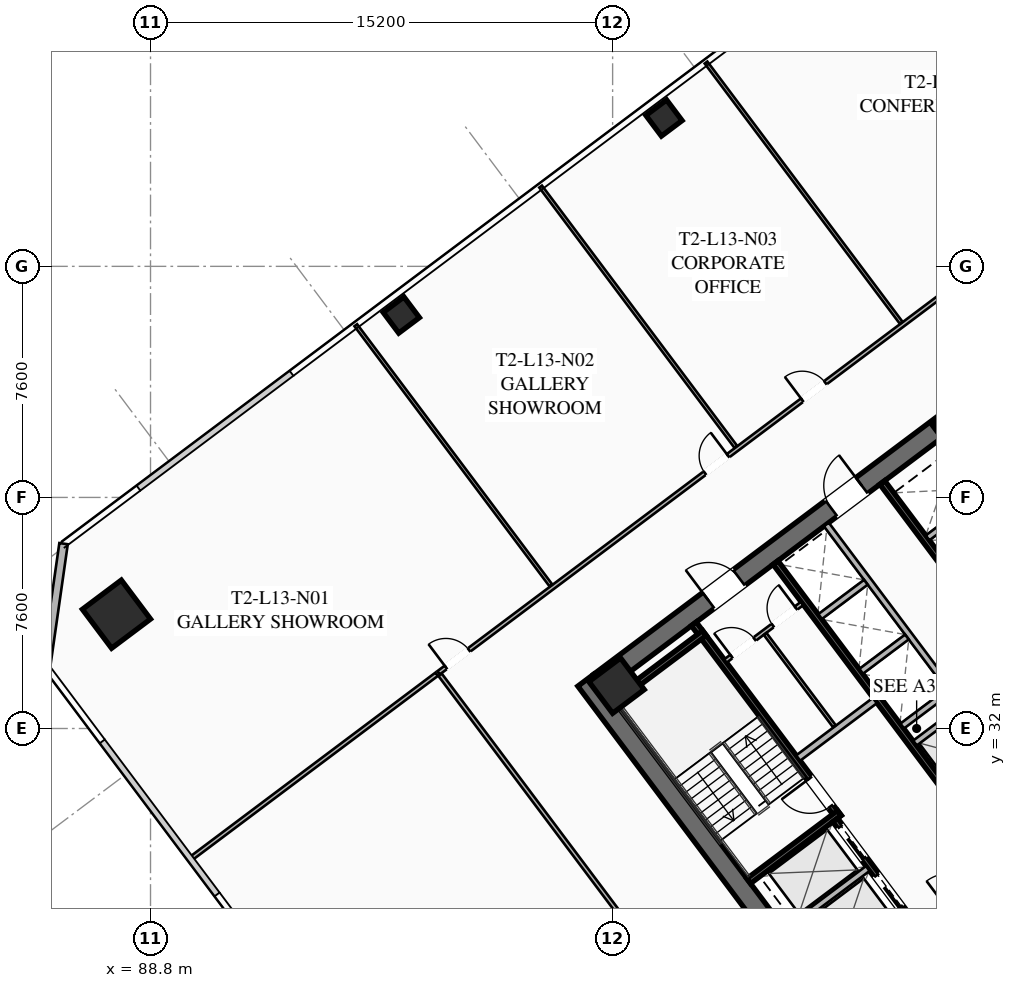
"""IFC4 building model, lengths in metres.
Left out: names, types, materials, properties, quantities, classifications, styles, units other than length and angle.
Written with IfcOpenShell. Run it as: python <this file> out.ifc"""

import sys

from ifc_helpers import new_model, si_unit, direction, frame, frame_2d, origin, origin_2d, place, context, subcontext, project, spatial, rectangle, hollow_rectangle, extrude, element, fill, save


model = new_model("IFC4")
c1 = context("Model", 3, precision=1e-05, world=origin(), true_north=direction((0.0, 1.0)))
c2 = subcontext(c1, "Body", "Model", "MODEL_VIEW")
j1 = project(units=[si_unit("LENGTHUNIT", "METRE"), si_unit("PLANEANGLEUNIT", "RADIAN")], contexts=[c1])
p1 = place(None, origin())
s1 = spatial("IfcSite", under=j1, at=p1, CompositionType="ELEMENT")
p2 = place(p1, origin())
s2 = spatial("IfcBuilding", under=s1, at=p2, CompositionType="ELEMENT")
p3 = place(p2, frame((0.0, 0.0, 53.0)))
s3 = spatial("IfcBuildingStorey", under=s2, at=p3, CompositionType="ELEMENT", Elevation=53.0)
p4 = place(p3, frame((112.476, 21.107, 0.0), z_axis=(0.0, 0.0, 1.0), x_axis=(-0.600005007985, 0.799996243986, 0.0)))
e1 = element("IfcWall", 1, at=p4, inside=s3, PredefinedType="SHEAR", context=c2, shape_type="SweptSolid", body=[
    extrude(rectangle(XDim=15.6, YDim=0.65, at=frame_2d((7.8, 0.0))), origin(), (0.0, 0.0, 1.0), 3.55),
])
p5 = place(p3, frame((124.429, 30.478, 0.0), z_axis=(0.0, 0.0, 1.0), x_axis=(-0.799998028465, -0.600002628705, 0.0)))
e2 = element("IfcWall", 2, at=p5, inside=s3, PredefinedType="SHEAR", context=c2, shape_type="SweptSolid", body=[
    extrude(rectangle(XDim=14.86, YDim=0.65, at=frame_2d((7.43, 0.0))), origin(), (0.0, 0.0, 1.0), 3.55),
])
p6 = place(p5, frame((9.13, 0.0, 0.0)))
e3 = element("IfcOpeningElement", 3, at=p6, cuts=e2, PredefinedType="OPENING", context=c2, shape_type="SweptSolid", body=[
    extrude(rectangle(XDim=1.25, YDim=2.25, at=frame_2d((0.625, 1.125))), frame((0.0, 0.335, 0.0), z_axis=(0.0, -1.0, 0.0), x_axis=(1.0, 0.0, 0.0)), (0.0, 0.0, 1.0), 0.67),
])
p7 = place(p5, frame((4.08, 0.0, 0.0)))
e4 = element("IfcOpeningElement", 4, at=p7, cuts=e2, PredefinedType="OPENING", context=c2, shape_type="SweptSolid", body=[
    extrude(rectangle(XDim=1.25, YDim=2.25, at=frame_2d((0.625, 1.125))), frame((0.0, 0.335, 0.0), z_axis=(0.0, -1.0, 0.0), x_axis=(1.0, 0.0, 0.0)), (0.0, 0.0, 1.0), 0.67),
])
p8 = place(p3, frame((103.571, 33.522, 0.0), z_axis=(0.0, 0.0, 1.0), x_axis=(0.799998028465, 0.600002628705, 0.0)))
e5 = element("IfcWall", 5, at=p8, inside=s3, PredefinedType="SHEAR", context=c2, shape_type="SweptSolid", body=[
    extrude(rectangle(XDim=14.86, YDim=0.65, at=frame_2d((7.43, 0.0))), origin(), (0.0, 0.0, 1.0), 3.55),
])
p9 = place(p8, frame((4.48, 0.0, 0.0)))
e6 = element("IfcOpeningElement", 6, at=p9, cuts=e5, PredefinedType="OPENING", context=c2, shape_type="SweptSolid", body=[
    extrude(rectangle(XDim=1.25, YDim=2.25, at=frame_2d((0.625, 1.125))), frame((0.0, 0.335, 0.0), z_axis=(0.0, -1.0, 0.0), x_axis=(1.0, 0.0, 0.0)), (0.0, 0.0, 1.0), 0.67),
])
p10 = place(p8, frame((9.53, 0.0, 0.0)))
e7 = element("IfcOpeningElement", 7, at=p10, cuts=e5, PredefinedType="OPENING", context=c2, shape_type="SweptSolid", body=[
    extrude(rectangle(XDim=1.25, YDim=2.25, at=frame_2d((0.625, 1.125))), frame((0.0, 0.335, 0.0), z_axis=(0.0, -1.0, 0.0), x_axis=(1.0, 0.0, 0.0)), (0.0, 0.0, 1.0), 0.67),
])
for number, where, z_axis, x_axis in (
    (8, (115.41, 41.87, 0.0), (0.0, 0.0, 1.0), (0.8, 0.6, 0.0)),
    (9, (104.13, 33.41, 0.0), (0.0, 0.0, 1.0), (0.8, 0.6, 0.0)),
):
    element("IfcColumn", number, at=place(p3, frame(where, z_axis=z_axis, x_axis=x_axis)), inside=s3, PredefinedType="COLUMN", context=c2, shape_type="SweptSolid", body=[
        extrude(hollow_rectangle(XDim=1.3, YDim=1.3, WallThickness=0.05, at=origin_2d()), origin(), (0.0, 0.0, 1.0), 3.35),
    ])
p11 = place(p3, frame((87.68, 35.76, 0.0), z_axis=(0.0, 0.0, 1.0), x_axis=(0.799999996291, 0.600000004945, 0.0)))
e10 = element("IfcColumn", 10, at=p11, inside=s3, PredefinedType="COLUMN", context=c2, shape_type="SweptSolid", body=[
    extrude(hollow_rectangle(XDim=1.6, YDim=1.6, WallThickness=0.06, at=origin_2d()), origin(), (0.0, 0.0, 1.0), 3.35),
])
for number, where, z_axis, x_axis in (
    (11, (105.69, 52.08, 0.0), (0.0, 0.0, 1.0), (0.8, 0.6, 0.0)),
    (12, (97.05, 45.6, 0.0), (0.0, 0.0, 1.0), (0.8, 0.6, 0.0)),
):
    element("IfcColumn", number, at=place(p3, frame(where, z_axis=z_axis, x_axis=x_axis)), inside=s3, PredefinedType="COLUMN", context=c2, shape_type="SweptSolid", body=[
        extrude(hollow_rectangle(XDim=0.85, YDim=0.85, WallThickness=0.035, at=origin_2d()), origin(), (0.0, 0.0, 1.0), 3.35),
    ])
p12 = place(p3, frame((85.36, 34.02, 0.0), z_axis=(0.0, 0.0, 1.0), x_axis=(0.14137968631, 0.989955445613, 0.0)))
e13 = element("IfcWall", 13, at=p12, inside=s3, PredefinedType="SOLIDWALL", context=c2, shape_type="SweptSolid", body=[
    extrude(rectangle(XDim=4.101, YDim=0.28, at=frame_2d((2.051, 0.0))), origin(), (0.0, 0.0, 1.0), 3.35),
])
p13 = place(p3, frame((111.44, 29.08, 0.0), z_axis=(0.0, 0.0, 1.0), x_axis=(-0.600009827119, 0.799992629566, 0.0)))
e14 = element("IfcWall", 14, at=p13, inside=s3, PredefinedType="SHEAR", context=c2, shape_type="SweptSolid", body=[
    extrude(rectangle(XDim=7.95, YDim=0.2, at=frame_2d((3.975, 0.0))), origin(), (0.0, 0.0, 1.0), 3.35),
])
p14 = place(p13, frame((0.45, 0.0, 0.0)))
e15 = element("IfcOpeningElement", 15, at=p14, cuts=e14, PredefinedType="OPENING", context=c2, shape_type="SweptSolid", body=[
    extrude(rectangle(XDim=1.15, YDim=2.2, at=frame_2d((0.575, 1.1))), frame((0.0, 0.11, 0.0), z_axis=(0.0, -1.0, 0.0), x_axis=(1.0, 0.0, 0.0)), (0.0, 0.0, 1.0), 0.22),
])
for number, where, z_axis, x_axis in (
    (16, (108.476, 26.982, 0.0), (0.0, 0.0, 1.0), (0.8, 0.6, 0.0)),
    (17, (104.036, 32.902, 0.0), (0.0, 0.0, 1.0), (0.8, 0.6, 0.0)),
):
    element("IfcWall", number, at=place(p3, frame(where, z_axis=z_axis, x_axis=x_axis)), inside=s3, PredefinedType="SHEAR", context=c2, shape_type="SweptSolid", body=[
        extrude(rectangle(XDim=3.73, YDim=0.2, at=frame_2d((1.865, 0.0))), origin(), (0.0, 0.0, 1.0), 3.35),
    ])
p15 = place(p3, frame((117.938, 26.016, 0.0), z_axis=(0.0, 0.0, 1.0), x_axis=(-0.600005463273, 0.799995902516, 0.0)))
e18 = element("IfcWall", 18, at=p15, inside=s3, PredefinedType="SHEAR", context=c2, shape_type="SweptSolid", body=[
    extrude(rectangle(XDim=14.3, YDim=0.2, at=frame_2d((7.15, 0.0))), origin(), (0.0, 0.0, 1.0), 3.35),
])
p16 = place(p3, frame((110.104, 31.028, 0.0), z_axis=(0.0, 0.0, 1.0), x_axis=(0.800018601094, 0.59997519774, 0.0)))
e19 = element("IfcWall", 19, at=p16, inside=s3, PredefinedType="SOLIDWALL", context=c2, shape_type="SweptSolid", body=[
    extrude(rectangle(XDim=3.15, YDim=0.22, at=frame_2d((1.575, 0.0))), origin(), (0.0, 0.0, 1.0), 2.703),
])
p17 = place(p3, frame((114.316, 25.412, 0.0), z_axis=(0.0, 0.0, 1.0), x_axis=(0.800018601094, 0.59997519774, 0.0)))
e20 = element("IfcWall", 20, at=p17, inside=s3, PredefinedType="SOLIDWALL", context=c2, shape_type="SweptSolid", body=[
    extrude(rectangle(XDim=3.15, YDim=0.22, at=frame_2d((1.575, 0.0))), origin(), (0.0, 0.0, 1.0), 2.703),
])
p18 = place(p17, frame((0.95, 0.0, 0.0)))
e21 = element("IfcOpeningElement", 21, at=p18, cuts=e20, PredefinedType="OPENING", context=c2, shape_type="SweptSolid", body=[
    extrude(rectangle(XDim=1.25, YDim=2.25, at=frame_2d((0.625, 1.125))), frame((0.0, 0.12, 0.0), z_axis=(0.0, -1.0, 0.0), x_axis=(1.0, 0.0, 0.0)), (0.0, 0.0, 1.0), 0.24),
])
p19 = place(p3, frame((115.13, 23.91, 0.0), z_axis=(0.0, 0.0, 1.0), x_axis=(-0.599975393228, 0.800018454488, 0.0)))
e22 = element("IfcWall", 22, at=p19, inside=s3, PredefinedType="SHEAR", context=c2, shape_type="SweptSolid", body=[
    extrude(rectangle(XDim=6.35, YDim=0.2, at=frame_2d((3.175, 0.0))), origin(), (0.0, 0.0, 1.0), 3.35),
])
p20 = place(p19, frame((4.775, 0.0, 0.0)))
e23 = element("IfcOpeningElement", 23, at=p20, cuts=e22, PredefinedType="OPENING", context=c2, shape_type="SweptSolid", body=[
    extrude(rectangle(XDim=1.3, YDim=2.25, at=frame_2d((0.65, 1.125))), frame((0.0, 0.11, 0.0), z_axis=(0.0, -1.0, 0.0), x_axis=(1.0, 0.0, 0.0)), (0.0, 0.0, 1.0), 0.22),
])
p21 = place(p19, frame((2.775, 0.0, 0.0)))
e24 = element("IfcOpeningElement", 24, at=p21, cuts=e22, PredefinedType="OPENING", context=c2, shape_type="SweptSolid", body=[
    extrude(rectangle(XDim=1.3, YDim=2.25, at=frame_2d((0.65, 1.125))), frame((0.0, 0.11, 0.0), z_axis=(0.0, -1.0, 0.0), x_axis=(1.0, 0.0, 0.0)), (0.0, 0.0, 1.0), 0.22),
])
p22 = place(p19, frame((0.575, 0.0, 0.0)))
e25 = element("IfcOpeningElement", 25, at=p22, cuts=e22, PredefinedType="OPENING", context=c2, shape_type="SweptSolid", body=[
    extrude(rectangle(XDim=1.3, YDim=2.25, at=frame_2d((0.65, 1.125))), frame((0.0, 0.11, 0.0), z_axis=(0.0, -1.0, 0.0), x_axis=(1.0, 0.0, 0.0)), (0.0, 0.0, 1.0), 0.22),
])
p23 = place(p3, frame((109.688, 25.366, 0.0), z_axis=(0.0, 0.0, 1.0), x_axis=(0.8, 0.6, 0.0)))
e26 = element("IfcWall", 26, at=p23, inside=s3, PredefinedType="SOLIDWALL", context=c2, shape_type="SweptSolid", body=[
    extrude(rectangle(XDim=3.38, YDim=0.2, at=frame_2d((1.69, 0.0))), origin(), (0.0, 0.0, 1.0), 3.35),
])
p24 = place(p3, frame((112.87, 40.09, 0.0), z_axis=(0.0, 0.0, 1.0), x_axis=(0.599975393228, -0.800018454488, 0.0)))
e27 = element("IfcWall", 27, at=p24, inside=s3, PredefinedType="SHEAR", context=c2, shape_type="SweptSolid", body=[
    extrude(rectangle(XDim=6.35, YDim=0.2, at=frame_2d((3.175, 0.0))), origin(), (0.0, 0.0, 1.0), 3.35),
])
p25 = place(p3, frame((114.36, 38.27, 0.0), z_axis=(0.0, 0.0, 1.0), x_axis=(0.799973995579, 0.600034670996, 0.0)))
e28 = element("IfcWall", 28, at=p25, inside=s3, PredefinedType="SOLIDWALL", context=c2, shape_type="SweptSolid", body=[
    extrude(rectangle(XDim=3.38, YDim=0.2, at=frame_2d((1.69, 0.0))), origin(), (0.0, 0.0, 1.0), 3.35),
])
p26 = place(p3, frame((107.71, 34.22, 0.0), z_axis=(0.0, 0.0, 1.0), x_axis=(0.799981399002, 0.60002480053, 0.0)))
e29 = element("IfcWall", 29, at=p26, inside=s3, PredefinedType="PARTITIONING", context=c2, shape_type="SweptSolid", body=[
    extrude(rectangle(XDim=3.15, YDim=0.135, at=frame_2d((1.575, 0.0))), origin(), (0.0, 0.0, 1.0), 2.703),
])
p27 = place(p26, frame((0.25, 0.0, 0.0)))
e30 = element("IfcOpeningElement", 30, at=p27, cuts=e29, PredefinedType="OPENING", context=c2, shape_type="SweptSolid", body=[
    extrude(rectangle(XDim=0.95, YDim=2.05, at=frame_2d((0.475, 1.025))), frame((0.0, 0.077, 0.0), z_axis=(0.0, -1.0, 0.0), x_axis=(1.0, 0.0, 0.0)), (0.0, 0.0, 1.0), 0.155),
])
p28 = place(p26, frame((1.95, 0.0, 0.0)))
e31 = element("IfcOpeningElement", 31, at=p28, cuts=e29, PredefinedType="OPENING", context=c2, shape_type="SweptSolid", body=[
    extrude(rectangle(XDim=0.95, YDim=2.05, at=frame_2d((0.475, 1.025))), frame((0.0, 0.077, 0.0), z_axis=(0.0, -1.0, 0.0), x_axis=(1.0, 0.0, 0.0)), (0.0, 0.0, 1.0), 0.155),
])
p29 = place(p3, frame((111.296, 32.072, 0.0), z_axis=(0.0, 0.0, 1.0), x_axis=(-0.59995887973, 0.800030838552, 0.0)))
e32 = element("IfcWall", 32, at=p29, inside=s3, PredefinedType="PARTITIONING", context=c2, shape_type="SweptSolid", body=[
    extrude(rectangle(XDim=3.8, YDim=0.11, at=frame_2d((1.9, 0.0))), origin(), (0.0, 0.0, 1.0), 2.703),
])
p30 = place(p3, frame((113.946, 31.522, 0.0), z_axis=(0.0, 0.0, 1.0), x_axis=(0.8, 0.6, 0.0)))
e33 = element("IfcWall", 33, at=p30, inside=s3, PredefinedType="SOLIDWALL", context=c2, shape_type="SweptSolid", body=[
    extrude(rectangle(XDim=1.88, YDim=0.2, at=frame_2d((0.94, 0.0))), origin(), (0.0, 0.0, 1.0), 3.35),
])
p31 = place(p3, frame((115.11, 33.27, 0.0), z_axis=(0.0, 0.0, 1.0), x_axis=(-0.600011488909, 0.79999138319, 0.0)))
e34 = element("IfcWall", 34, at=p31, inside=s3, PredefinedType="SOLIDWALL", context=c2, shape_type="SweptSolid", body=[
    extrude(rectangle(XDim=6.8, YDim=0.2, at=frame_2d((3.4, 0.0))), origin(), (0.0, 0.0, 1.0), 3.35),
])
p32 = place(p3, frame((113.526, 32.082, 0.0), z_axis=(0.0, 0.0, 1.0), x_axis=(0.800046745961, 0.599937666993, 0.0)))
e35 = element("IfcWall", 35, at=p32, inside=s3, PredefinedType="SOLIDWALL", context=c2, shape_type="SweptSolid", body=[
    extrude(rectangle(XDim=1.88, YDim=0.2, at=frame_2d((0.94, 0.0))), origin(), (0.0, 0.0, 1.0), 3.35),
])
p33 = place(p3, frame((112.176, 33.882, 0.0), z_axis=(0.0, 0.0, 1.0), x_axis=(0.8, 0.6, 0.0)))
e36 = element("IfcWall", 36, at=p33, inside=s3, PredefinedType="SOLIDWALL", context=c2, shape_type="SweptSolid", body=[
    extrude(rectangle(XDim=1.88, YDim=0.2, at=frame_2d((0.94, 0.0))), origin(), (0.0, 0.0, 1.0), 3.35),
])
p34 = place(p3, frame((110.826, 35.682, 0.0), z_axis=(0.0, 0.0, 1.0), x_axis=(0.799984418148, 0.600020775241, 0.0)))
e37 = element("IfcWall", 37, at=p34, inside=s3, PredefinedType="SOLIDWALL", context=c2, shape_type="SweptSolid", body=[
    extrude(rectangle(XDim=1.88, YDim=0.2, at=frame_2d((0.94, 0.0))), origin(), (0.0, 0.0, 1.0), 3.35),
])
p35 = place(p3, frame((98.276, 33.832, 0.0), z_axis=(0.0, 0.0, 1.0), x_axis=(0.800001944698, 0.59999740706, 0.0)))
e38 = element("IfcWall", 38, at=p35, inside=s3, PredefinedType="PARTITIONING", context=c2, shape_type="SweptSolid", body=[
    extrude(rectangle(XDim=30.13, YDim=0.135, at=frame_2d((15.065, 0.0))), origin(), (0.0, 0.0, 1.0), 2.703),
])
p36 = place(p35, frame((0.3, 0.0, 0.0)))
e39 = element("IfcOpeningElement", 39, at=p36, cuts=e38, PredefinedType="OPENING", context=c2, shape_type="SweptSolid", body=[
    extrude(rectangle(XDim=0.95, YDim=2.05, at=frame_2d((0.475, 1.025))), frame((0.0, 0.077, 0.0), z_axis=(0.0, -1.0, 0.0), x_axis=(1.0, 0.0, 0.0)), (0.0, 0.0, 1.0), 0.155),
])
p37 = place(p35, frame((10.95, 0.0, 0.0)))
e40 = element("IfcOpeningElement", 40, at=p37, cuts=e38, PredefinedType="OPENING", context=c2, shape_type="SweptSolid", body=[
    extrude(rectangle(XDim=0.95, YDim=2.05, at=frame_2d((0.475, 1.025))), frame((0.0, 0.077, 0.0), z_axis=(0.0, -1.0, 0.0), x_axis=(1.0, 0.0, 0.0)), (0.0, 0.0, 1.0), 0.155),
])
p38 = place(p35, frame((14.95, 0.0, 0.0)))
e41 = element("IfcOpeningElement", 41, at=p38, cuts=e38, PredefinedType="OPENING", context=c2, shape_type="SweptSolid", body=[
    extrude(rectangle(XDim=0.95, YDim=2.05, at=frame_2d((0.475, 1.025))), frame((0.0, 0.077, 0.0), z_axis=(0.0, -1.0, 0.0), x_axis=(1.0, 0.0, 0.0)), (0.0, 0.0, 1.0), 0.155),
])
p39 = place(p35, frame((28.88, 0.0, 0.0)))
e42 = element("IfcOpeningElement", 42, at=p39, cuts=e38, PredefinedType="OPENING", context=c2, shape_type="SweptSolid", body=[
    extrude(rectangle(XDim=0.95, YDim=2.05, at=frame_2d((0.475, 1.025))), frame((0.0, 0.077, 0.0), z_axis=(0.0, -1.0, 0.0), x_axis=(1.0, 0.0, 0.0)), (0.0, 0.0, 1.0), 0.155),
])
p40 = place(p3, frame((101.972, 36.704, 0.0), z_axis=(0.0, 0.0, 1.0), x_axis=(-0.600003650761, 0.799997261916, 0.0)))
e43 = element("IfcWall", 43, at=p40, inside=s3, PredefinedType="PARTITIONING", context=c2, shape_type="SweptSolid", body=[
    extrude(rectangle(XDim=10.7, YDim=0.11, at=frame_2d((5.35, 0.0))), origin(), (0.0, 0.0, 1.0), 2.703),
])
for number, where, z_axis, x_axis in (
    (44, (108.052, 41.264, 0.0), (0.0, 0.0, 1.0), (-0.6, 0.8, 0.0)),
    (45, (113.492, 45.344, 0.0), (0.0, 0.0, 1.0), (-0.6, 0.8, 0.0)),
):
    element("IfcWall", number, at=place(p3, frame(where, z_axis=z_axis, x_axis=x_axis)), inside=s3, PredefinedType="PARTITIONING", context=c2, shape_type="SweptSolid", body=[
        extrude(rectangle(XDim=10.7, YDim=0.11, at=frame_2d((5.35, 0.0))), origin(), (0.0, 0.0, 1.0), 2.703),
    ])
p41 = place(p3, frame((135.46, 34.47, 0.0), z_axis=(0.0, 0.0, 1.0), x_axis=(-0.800001944698, -0.59999740706, 0.0)))
e46 = element("IfcWall", 46, at=p41, inside=s3, PredefinedType="PARTITIONING", context=c2, shape_type="SweptSolid", body=[
    extrude(rectangle(XDim=30.13, YDim=0.135, at=frame_2d((15.065, 0.0))), origin(), (0.0, 0.0, 1.0), 2.703),
])
p42 = place(p41, frame((28.8, 0.0, 0.0)))
e47 = element("IfcOpeningElement", 47, at=p42, cuts=e46, PredefinedType="OPENING", context=c2, shape_type="SweptSolid", body=[
    extrude(rectangle(XDim=0.95, YDim=2.05, at=frame_2d((0.475, 1.025))), frame((0.0, 0.077, 0.0), z_axis=(0.0, -1.0, 0.0), x_axis=(1.0, 0.0, 0.0)), (0.0, 0.0, 1.0), 0.155),
])
p43 = place(p41, frame((17.921, 0.0, 0.0)))
e48 = element("IfcOpeningElement", 48, at=p43, cuts=e46, PredefinedType="OPENING", context=c2, shape_type="SweptSolid", body=[
    extrude(rectangle(XDim=0.95, YDim=2.05, at=frame_2d((0.475, 1.025))), frame((0.0, 0.077, 0.0), z_axis=(0.0, -1.0, 0.0), x_axis=(1.0, 0.0, 0.0)), (0.0, 0.0, 1.0), 0.155),
])
p44 = place(p41, frame((14.129, 0.0, 0.0)))
e49 = element("IfcOpeningElement", 49, at=p44, cuts=e46, PredefinedType="OPENING", context=c2, shape_type="SweptSolid", body=[
    extrude(rectangle(XDim=0.95, YDim=2.05, at=frame_2d((0.475, 1.025))), frame((0.0, 0.077, 0.0), z_axis=(0.0, -1.0, 0.0), x_axis=(1.0, 0.0, 0.0)), (0.0, 0.0, 1.0), 0.155),
])
p45 = place(p41, frame((0.38, 0.0, 0.0)))
e50 = element("IfcOpeningElement", 50, at=p45, cuts=e46, PredefinedType="OPENING", context=c2, shape_type="SweptSolid", body=[
    extrude(rectangle(XDim=0.95, YDim=2.05, at=frame_2d((0.475, 1.025))), frame((0.0, 0.077, 0.0), z_axis=(0.0, -1.0, 0.0), x_axis=(1.0, 0.0, 0.0)), (0.0, 0.0, 1.0), 0.155),
])
p46 = place(p3, frame((111.308, 16.456, 0.0), z_axis=(0.0, 0.0, 1.0), x_axis=(-0.600003610192, 0.799997292343, 0.0)))
e51 = element("IfcWall", 51, at=p46, inside=s3, PredefinedType="PARTITIONING", context=c2, shape_type="SweptSolid", body=[
    extrude(rectangle(XDim=21.64, YDim=0.135, at=frame_2d((10.82, 0.0))), origin(), (0.0, 0.0, 1.0), 2.703),
])
p47 = place(p46, frame((0.3, 0.0, 0.0)))
e52 = element("IfcOpeningElement", 52, at=p47, cuts=e51, PredefinedType="OPENING", context=c2, shape_type="SweptSolid", body=[
    extrude(rectangle(XDim=0.95, YDim=2.05, at=frame_2d((0.475, 1.025))), frame((0.0, 0.077, 0.0), z_axis=(0.0, -1.0, 0.0), x_axis=(1.0, 0.0, 0.0)), (0.0, 0.0, 1.0), 0.155),
])
p48 = place(p3, frame((98.212, 33.784, 0.0), z_axis=(0.0, 0.0, 1.0), x_axis=(-0.799997105034, -0.600003859935, 0.0)))
e53 = element("IfcWall", 53, at=p48, inside=s3, PredefinedType="PARTITIONING", context=c2, shape_type="SweptSolid", body=[
    extrude(rectangle(XDim=10.12, YDim=0.135, at=frame_2d((5.06, 0.0))), origin(), (0.0, 0.0, 1.0), 2.703),
])
p49 = place(p9, origin())
e54 = element("IfcDoor", 54, at=p49, inside=s3, OperationType="SINGLE_SWING_LEFT", PredefinedType="DOOR", context=c2, shape_type="SweptSolid", body=[
    extrude(rectangle(XDim=1.25, YDim=2.25, at=frame_2d((0.625, 1.125))), frame((0.0, 0.025, 0.0), z_axis=(0.0, -1.0, 0.0), x_axis=(1.0, 0.0, 0.0)), (0.0, 0.0, 1.0), 0.05),
])
fill(e6, e54)
p50 = place(p10, origin())
e55 = element("IfcDoor", 55, at=p50, inside=s3, OperationType="SINGLE_SWING_RIGHT", PredefinedType="DOOR", context=c2, shape_type="SweptSolid", body=[
    extrude(rectangle(XDim=1.25, YDim=2.25, at=frame_2d((0.625, 1.125))), frame((0.0, 0.025, 0.0), z_axis=(0.0, -1.0, 0.0), x_axis=(1.0, 0.0, 0.0)), (0.0, 0.0, 1.0), 0.05),
])
fill(e7, e55)
p51 = place(p14, origin())
e56 = element("IfcDoor", 56, at=p51, inside=s3, OperationType="SINGLE_SWING_RIGHT", PredefinedType="DOOR", context=c2, shape_type="SweptSolid", body=[
    extrude(rectangle(XDim=1.15, YDim=2.2, at=frame_2d((0.575, 1.1))), frame((0.0, 0.025, 0.0), z_axis=(0.0, -1.0, 0.0), x_axis=(1.0, 0.0, 0.0)), (0.0, 0.0, 1.0), 0.05),
])
fill(e15, e56)
p52 = place(p27, origin())
e57 = element("IfcDoor", 57, at=p52, inside=s3, OperationType="SINGLE_SWING_LEFT", PredefinedType="DOOR", context=c2, shape_type="SweptSolid", body=[
    extrude(rectangle(XDim=0.95, YDim=2.05, at=frame_2d((0.475, 1.025))), frame((0.0, 0.025, 0.0), z_axis=(0.0, -1.0, 0.0), x_axis=(1.0, 0.0, 0.0)), (0.0, 0.0, 1.0), 0.05),
])
fill(e30, e57)
p53 = place(p28, origin())
e58 = element("IfcDoor", 58, at=p53, inside=s3, OperationType="SINGLE_SWING_RIGHT", PredefinedType="DOOR", context=c2, shape_type="SweptSolid", body=[
    extrude(rectangle(XDim=0.95, YDim=2.05, at=frame_2d((0.475, 1.025))), frame((0.0, 0.025, 0.0), z_axis=(0.0, -1.0, 0.0), x_axis=(1.0, 0.0, 0.0)), (0.0, 0.0, 1.0), 0.05),
])
fill(e31, e58)
p54 = place(p36, origin())
e59 = element("IfcDoor", 59, at=p54, inside=s3, OperationType="SINGLE_SWING_LEFT", PredefinedType="DOOR", context=c2, shape_type="SweptSolid", body=[
    extrude(rectangle(XDim=0.95, YDim=2.05, at=frame_2d((0.475, 1.025))), frame((0.0, 0.025, 0.0), z_axis=(0.0, -1.0, 0.0), x_axis=(1.0, 0.0, 0.0)), (0.0, 0.0, 1.0), 0.05),
])
fill(e39, e59)
p55 = place(p37, origin())
e60 = element("IfcDoor", 60, at=p55, inside=s3, OperationType="SINGLE_SWING_RIGHT", PredefinedType="DOOR", context=c2, shape_type="SweptSolid", body=[
    extrude(rectangle(XDim=0.95, YDim=2.05, at=frame_2d((0.475, 1.025))), frame((0.0, 0.025, 0.0), z_axis=(0.0, -1.0, 0.0), x_axis=(1.0, 0.0, 0.0)), (0.0, 0.0, 1.0), 0.05),
])
fill(e40, e60)
p56 = place(p38, origin())
e61 = element("IfcDoor", 61, at=p56, inside=s3, OperationType="SINGLE_SWING_LEFT", PredefinedType="DOOR", context=c2, shape_type="SweptSolid", body=[
    extrude(rectangle(XDim=0.95, YDim=2.05, at=frame_2d((0.475, 1.025))), frame((0.0, 0.025, 0.0), z_axis=(0.0, -1.0, 0.0), x_axis=(1.0, 0.0, 0.0)), (0.0, 0.0, 1.0), 0.05),
])
fill(e41, e61)
p57 = place(p20, origin())
e62 = element("IfcDoor", 62, at=p57, inside=s3, OperationType="SLIDING_TO_LEFT", PredefinedType="DOOR", context=c2, shape_type="SweptSolid", body=[
    extrude(rectangle(XDim=1.3, YDim=2.25, at=frame_2d((0.65, 1.125))), frame((0.0, 0.025, 0.0), z_axis=(0.0, -1.0, 0.0), x_axis=(1.0, 0.0, 0.0)), (0.0, 0.0, 1.0), 0.05),
])
fill(e23, e62)
p58 = place(p21, origin())
e63 = element("IfcDoor", 63, at=p58, inside=s3, OperationType="SLIDING_TO_LEFT", PredefinedType="DOOR", context=c2, shape_type="SweptSolid", body=[
    extrude(rectangle(XDim=1.3, YDim=2.25, at=frame_2d((0.65, 1.125))), frame((0.0, 0.025, 0.0), z_axis=(0.0, -1.0, 0.0), x_axis=(1.0, 0.0, 0.0)), (0.0, 0.0, 1.0), 0.05),
])
fill(e24, e63)
save(model, sys.argv[1])
